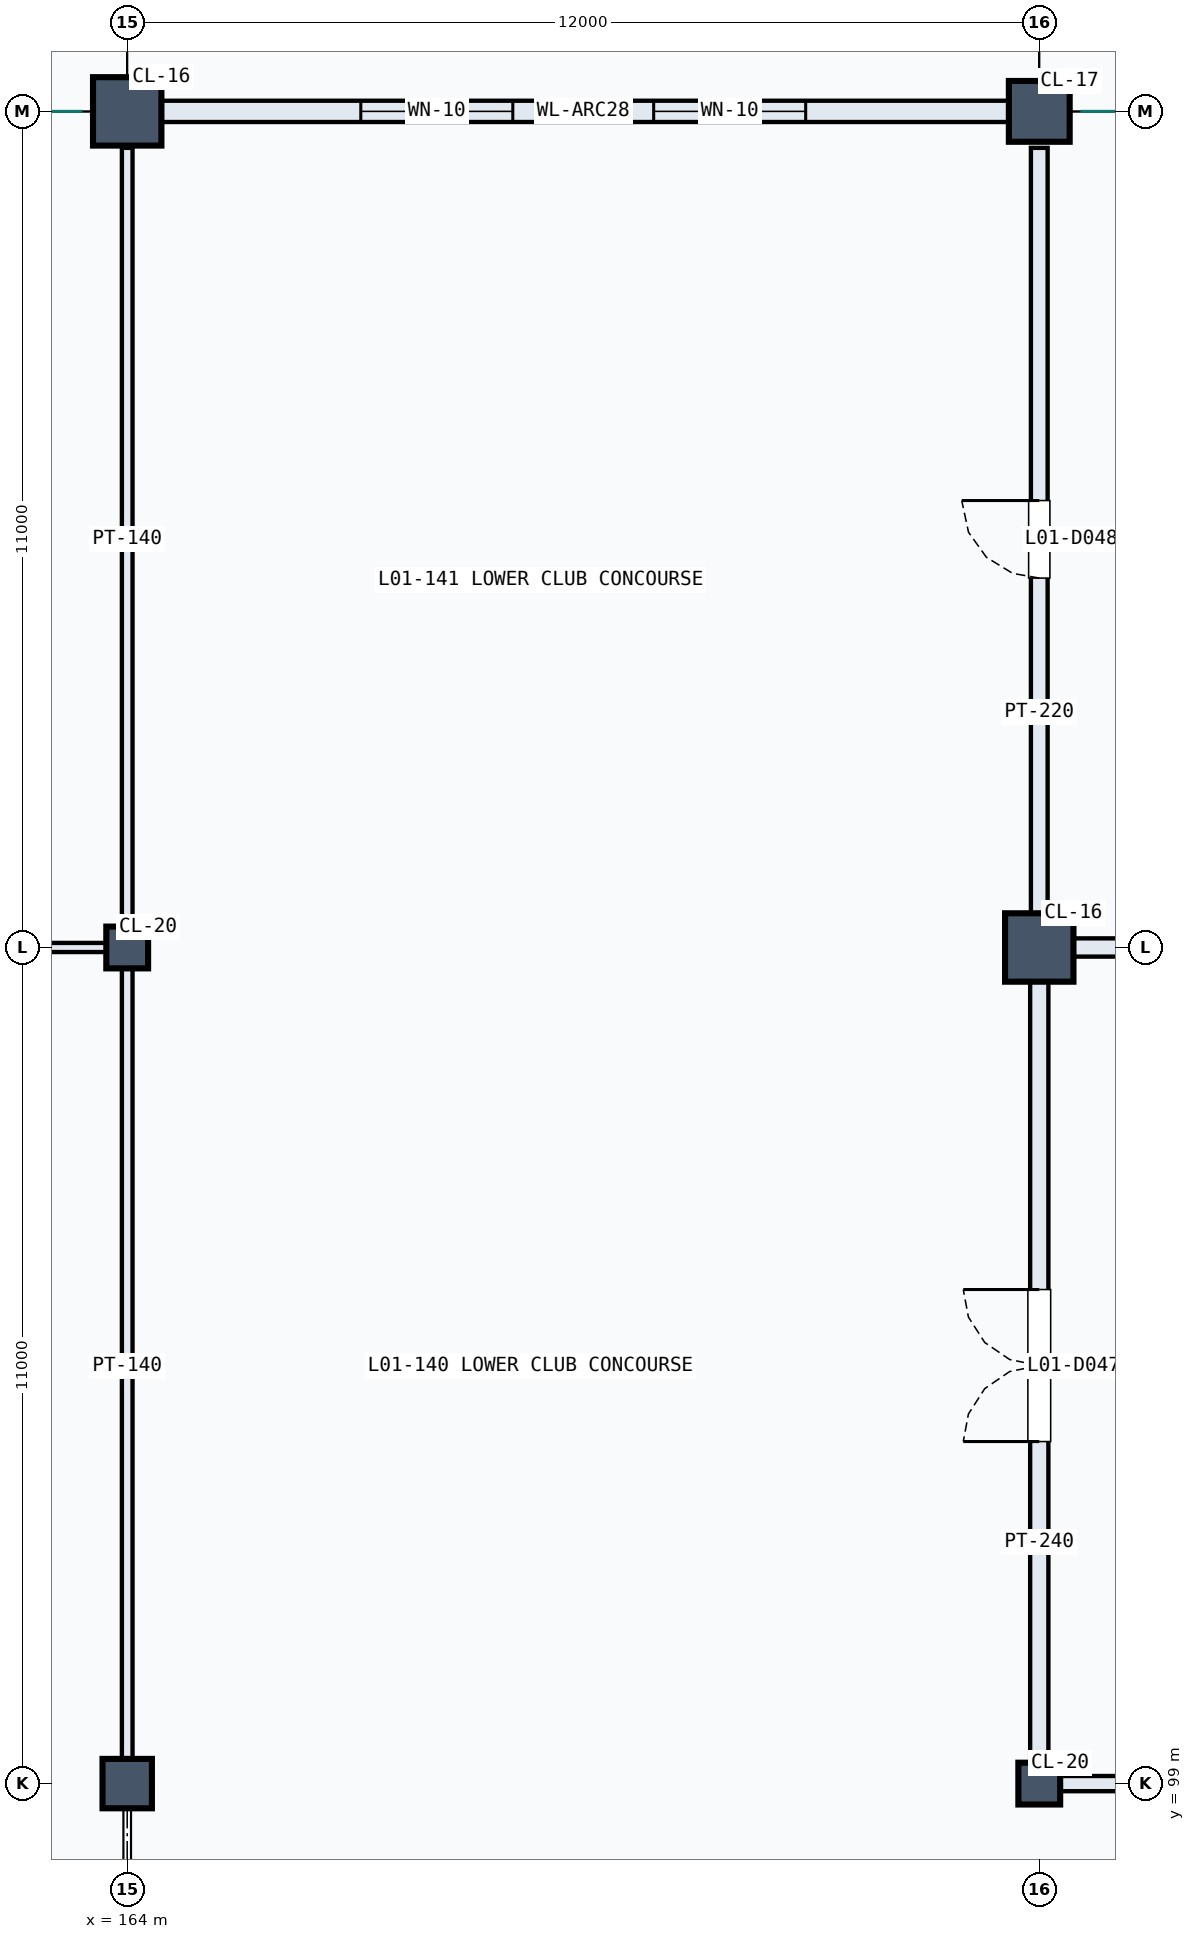
"""IFC4 building model, lengths in metres.
Left out: names, types, materials, properties, quantities, classifications, styles, units other than length and angle.
Written with IfcOpenShell. Run it as: python <this file> out.ifc"""

import sys

from ifc_helpers import new_model, si_unit, direction, frame, frame_2d, origin, origin_2d, place, context, subcontext, project, spatial, rectangle, circle, extrude, element, fill, save


model = new_model("IFC4")
c1 = context("Model", 3, precision=1e-05, world=origin(), true_north=direction((0.0, 1.0)))
c2 = subcontext(c1, "Body", "Model", "MODEL_VIEW")
j1 = project(units=[si_unit("LENGTHUNIT", "METRE"), si_unit("PLANEANGLEUNIT", "RADIAN")], contexts=[c1])
p1 = place(None, origin())
s1 = spatial("IfcSite", under=j1, at=p1, CompositionType="ELEMENT")
p2 = place(p1, origin())
s2 = spatial("IfcBuilding", under=s1, at=p2, CompositionType="ELEMENT")
p3 = place(p2, frame((0.0, 0.0, 5.4)))
s3 = spatial("IfcBuildingStorey", under=s2, at=p3, CompositionType="ELEMENT", Elevation=5.4)
p4 = place(p3, frame((164.0, 99.0, 0.0), z_axis=(0.0, 0.0, 1.0), x_axis=(1.0, 0.0, 0.0)))
e1 = element("IfcColumn", 1, at=p4, inside=s3, PredefinedType="COLUMN", context=c2, shape_type="SweptSolid", body=[
    extrude(circle(Radius=0.325, at=origin_2d()), origin(), (0.0, 0.0, 1.0), 4.8),
])
p5 = place(p3, frame((164.0, 110.0, 0.0), z_axis=(0.0, 0.0, 1.0), x_axis=(1.0, 0.0, 0.0)))
e2 = element("IfcColumn", 2, at=p5, inside=s3, PredefinedType="COLUMN", context=c2, shape_type="SweptSolid", body=[
    extrude(circle(Radius=0.275, at=origin_2d()), origin(), (0.0, 0.0, 1.0), 4.8),
])
p6 = place(p3, frame((164.0, 121.0, 0.0), z_axis=(0.0, 0.0, 1.0), x_axis=(1.0, 0.0, 0.0)))
e3 = element("IfcColumn", 3, at=p6, inside=s3, PredefinedType="COLUMN", context=c2, shape_type="SweptSolid", body=[
    extrude(circle(Radius=0.45, at=origin_2d()), origin(), (0.0, 0.0, 1.0), 4.8),
])
p7 = place(p3, frame((176.0, 99.0, 0.0), z_axis=(0.0, 0.0, 1.0), x_axis=(1.0, 0.0, 0.0)))
e4 = element("IfcColumn", 4, at=p7, inside=s3, PredefinedType="COLUMN", context=c2, shape_type="SweptSolid", body=[
    extrude(circle(Radius=0.275, at=origin_2d()), origin(), (0.0, 0.0, 1.0), 4.8),
])
p8 = place(p3, frame((176.0, 110.0, 0.0), z_axis=(0.0, 0.0, 1.0), x_axis=(1.0, 0.0, 0.0)))
e5 = element("IfcColumn", 5, at=p8, inside=s3, PredefinedType="COLUMN", context=c2, shape_type="SweptSolid", body=[
    extrude(circle(Radius=0.45, at=origin_2d()), origin(), (0.0, 0.0, 1.0), 4.8),
])
p9 = place(p3, frame((176.0, 121.0, 0.0), z_axis=(0.0, 0.0, 1.0), x_axis=(1.0, 0.0, 0.0)))
e6 = element("IfcColumn", 6, at=p9, inside=s3, PredefinedType="COLUMN", context=c2, shape_type="SweptSolid", body=[
    extrude(circle(Radius=0.4, at=origin_2d()), origin(), (0.0, 0.0, 1.0), 4.8),
])
p10 = place(p3, frame((164.22, 121.0, 0.0), z_axis=(0.0, 0.0, 1.0), x_axis=(1.0, 0.0, 0.0)))
e7 = element("IfcWall", 7, at=p10, inside=s3, PredefinedType="SOLIDWALL", context=c2, shape_type="SweptSolid", body=[
    extrude(rectangle(XDim=11.56, YDim=0.28, at=frame_2d((5.78, 0.0))), origin(), (0.0, 0.0, 1.0), 3.705),
])
p11 = place(p10, frame((2.853, 0.0, 0.9)))
e8 = element("IfcOpeningElement", 8, at=p11, cuts=e7, PredefinedType="OPENING", context=c2, shape_type="SweptSolid", body=[
    extrude(rectangle(XDim=2.0, YDim=1.65, at=frame_2d((1.0, 0.825))), frame((0.0, 0.15, 0.0), z_axis=(0.0, -1.0, 0.0), x_axis=(1.0, 0.0, 0.0)), (0.0, 0.0, 1.0), 0.3),
])
p12 = place(p10, frame((6.707, 0.0, 0.9)))
e9 = element("IfcOpeningElement", 9, at=p12, cuts=e7, PredefinedType="OPENING", context=c2, shape_type="SweptSolid", body=[
    extrude(rectangle(XDim=2.0, YDim=1.65, at=frame_2d((1.0, 0.825))), frame((0.0, 0.15, 0.0), z_axis=(0.0, -1.0, 0.0), x_axis=(1.0, 0.0, 0.0)), (0.0, 0.0, 1.0), 0.3),
])
p13 = place(p3, frame((164.0, 99.22, 0.0), z_axis=(0.0, 0.0, 1.0), x_axis=(0.0, 1.0, 0.0)))
e10 = element("IfcWall", 10, at=p13, inside=s3, PredefinedType="PARTITIONING", context=c2, shape_type="SweptSolid", body=[
    extrude(rectangle(XDim=10.56, YDim=0.14, at=frame_2d((5.28, 0.0))), origin(), (0.0, 0.0, 1.0), 3.69),
])
p14 = place(p3, frame((164.0, 110.22, 0.0), z_axis=(0.0, 0.0, 1.0), x_axis=(0.0, 1.0, 0.0)))
e11 = element("IfcWall", 11, at=p14, inside=s3, PredefinedType="PARTITIONING", context=c2, shape_type="SweptSolid", body=[
    extrude(rectangle(XDim=10.3, YDim=0.14, at=frame_2d((5.15, 0.0))), origin(), (0.0, 0.0, 1.0), 3.705),
])
p15 = place(p3, frame((176.0, 99.22, 0.0), z_axis=(0.0, 0.0, 1.0), x_axis=(0.0, 1.0, 0.0)))
e12 = element("IfcWall", 12, at=p15, inside=s3, PredefinedType="PARTITIONING", context=c2, shape_type="SweptSolid", body=[
    extrude(rectangle(XDim=10.56, YDim=0.24, at=frame_2d((5.28, 0.0))), origin(), (0.0, 0.0, 1.0), 3.705),
])
p16 = place(p15, frame((4.28, 0.0, 0.0)))
e13 = element("IfcOpeningElement", 13, at=p16, cuts=e12, PredefinedType="OPENING", context=c2, shape_type="SweptSolid", body=[
    extrude(rectangle(XDim=2.0, YDim=2.25, at=frame_2d((1.0, 1.125))), frame((0.0, 0.13, 0.0), z_axis=(0.0, -1.0, 0.0), x_axis=(1.0, 0.0, 0.0)), (0.0, 0.0, 1.0), 0.26),
])
p17 = place(p3, frame((176.0, 110.22, 0.0), z_axis=(0.0, 0.0, 1.0), x_axis=(0.0, 1.0, 0.0)))
e14 = element("IfcWall", 14, at=p17, inside=s3, PredefinedType="PARTITIONING", context=c2, shape_type="SweptSolid", body=[
    extrude(rectangle(XDim=10.3, YDim=0.22, at=frame_2d((5.15, 0.0))), origin(), (0.0, 0.0, 1.0), 3.705),
])
p18 = place(p17, frame((4.64, 0.0, 0.0)))
e15 = element("IfcOpeningElement", 15, at=p18, cuts=e14, PredefinedType="OPENING", context=c2, shape_type="SweptSolid", body=[
    extrude(rectangle(XDim=1.02, YDim=2.25, at=frame_2d((0.51, 1.125))), frame((0.0, 0.12, 0.0), z_axis=(0.0, -1.0, 0.0), x_axis=(1.0, 0.0, 0.0)), (0.0, 0.0, 1.0), 0.24),
])
p19 = place(p3, frame((176.22, 99.0, 0.0), z_axis=(0.0, 0.0, 1.0), x_axis=(1.0, 0.0, 0.0)))
e16 = element("IfcWall", 16, at=p19, inside=s3, PredefinedType="PARTITIONING", context=c2, shape_type="SweptSolid", body=[
    extrude(rectangle(XDim=10.56, YDim=0.2, at=frame_2d((5.28, 0.0))), origin(), (0.0, 0.0, 1.0), 3.705),
])
p20 = place(p3, frame((152.22, 110.0, 0.0), z_axis=(0.0, 0.0, 1.0), x_axis=(1.0, 0.0, 0.0)))
e17 = element("IfcWall", 17, at=p20, inside=s3, PredefinedType="PARTITIONING", context=c2, shape_type="SweptSolid", body=[
    extrude(rectangle(XDim=11.56, YDim=0.12, at=frame_2d((5.78, 0.0))), origin(), (0.0, 0.0, 1.0), 3.705),
])
p21 = place(p3, frame((176.22, 110.0, 0.0), z_axis=(0.0, 0.0, 1.0), x_axis=(1.0, 0.0, 0.0)))
e18 = element("IfcWall", 18, at=p21, inside=s3, PredefinedType="PARTITIONING", context=c2, shape_type="SweptSolid", body=[
    extrude(rectangle(XDim=10.56, YDim=0.24, at=frame_2d((5.28, 0.0))), origin(), (0.0, 0.0, 1.0), 3.705),
])
p22 = place(p11, origin())
e19 = element("IfcWindow", 19, at=p22, inside=s3, PartitioningType="SINGLE_PANEL", PredefinedType="WINDOW", context=c2, shape_type="SweptSolid", body=[
    extrude(rectangle(XDim=2.0, YDim=1.65, at=frame_2d((1.0, 0.825))), frame((0.0, 0.03, 0.0), z_axis=(0.0, -1.0, 0.0), x_axis=(1.0, 0.0, 0.0)), (0.0, 0.0, 1.0), 0.06),
])
fill(e8, e19)
p23 = place(p12, origin())
e20 = element("IfcWindow", 20, at=p23, inside=s3, PartitioningType="SINGLE_PANEL", PredefinedType="WINDOW", context=c2, shape_type="SweptSolid", body=[
    extrude(rectangle(XDim=2.0, YDim=1.65, at=frame_2d((1.0, 0.825))), frame((0.0, 0.03, 0.0), z_axis=(0.0, -1.0, 0.0), x_axis=(1.0, 0.0, 0.0)), (0.0, 0.0, 1.0), 0.06),
])
fill(e9, e20)
p24 = place(p16, origin())
e21 = element("IfcDoor", 21, at=p24, inside=s3, OperationType="DOUBLE_DOOR_SINGLE_SWING", PredefinedType="DOOR", context=c2, shape_type="SweptSolid", body=[
    extrude(rectangle(XDim=2.0, YDim=2.25, at=frame_2d((1.0, 1.125))), frame((0.0, 0.025, 0.0), z_axis=(0.0, -1.0, 0.0), x_axis=(1.0, 0.0, 0.0)), (0.0, 0.0, 1.0), 0.05),
])
fill(e13, e21)
p25 = place(p18, origin())
e22 = element("IfcDoor", 22, at=p25, inside=s3, OperationType="SINGLE_SWING_RIGHT", PredefinedType="DOOR", context=c2, shape_type="SweptSolid", body=[
    extrude(rectangle(XDim=1.02, YDim=2.25, at=frame_2d((0.51, 1.125))), frame((0.0, 0.025, 0.0), z_axis=(0.0, -1.0, 0.0), x_axis=(1.0, 0.0, 0.0)), (0.0, 0.0, 1.0), 0.05),
])
fill(e15, e22)
save(model, sys.argv[1])
